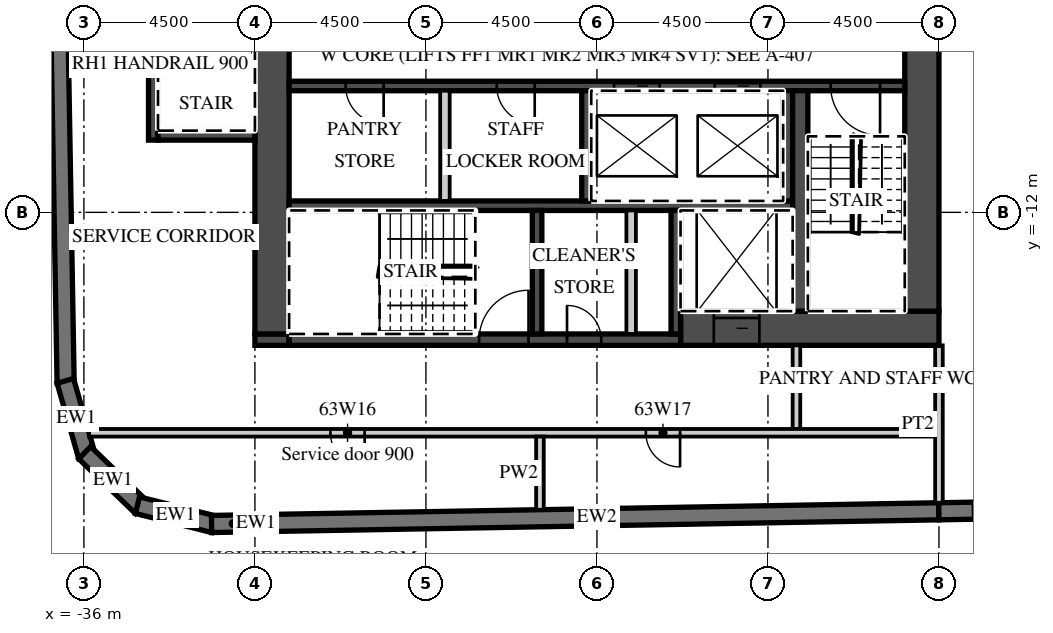
"""IFC4 building model, lengths in metres.
Left out: names, types, materials, properties, quantities, classifications, styles, units other than length and angle.
Written with IfcOpenShell. Run it as: python <this file> out.ifc"""

import sys

from ifc_helpers import new_model, si_unit, direction, frame, frame_2d, origin, place, context, subcontext, project, spatial, polyline, rectangle, outline, extrude, element, fill, save


model = new_model("IFC4")
c1 = context("Model", 3, precision=1e-05, world=origin(), true_north=direction((0.0, 1.0)))
c2 = subcontext(c1, "Body", "Model", "MODEL_VIEW")
j1 = project(units=[si_unit("LENGTHUNIT", "METRE"), si_unit("PLANEANGLEUNIT", "RADIAN")], contexts=[c1])
p1 = place(None, origin())
s1 = spatial("IfcSite", under=j1, at=p1, CompositionType="ELEMENT")
p2 = place(p1, origin())
s2 = spatial("IfcBuilding", under=s1, at=p2, CompositionType="ELEMENT")
p3 = place(p2, frame((0.0, 0.0, 254.0)))
s3 = spatial("IfcBuildingStorey", under=s2, at=p3, CompositionType="ELEMENT", Elevation=254.0)
p4 = place(p3, frame((-37.057, 16.503, 0.0), z_axis=(0.0, 0.0, 1.0), x_axis=(0.017452279857, -0.999847697366, 0.0)))
e1 = element("IfcWall", 1, at=p4, inside=s3, PredefinedType="SOLIDWALL", context=c2, shape_type="SweptSolid", body=[
    extrude(rectangle(XDim=33.0, YDim=0.45, at=frame_2d((16.5, 0.0))), origin(), (0.0, 0.0, 1.0), 3.0),
])
p5 = place(p3, frame((-36.49, -16.434, 0.0), z_axis=(0.0, 0.0, 1.0), x_axis=(0.275577603096, -0.961278827745, 0.0)))
e2 = element("IfcWall", 2, at=p5, inside=s3, PredefinedType="SOLIDWALL", context=c2, shape_type="SweptSolid", body=[
    extrude(outline(polyline([(0.0, -0.225), (2.071, -0.225), (1.95, 0.225), (0.121, 0.225), (0.0, -0.225)])), origin(), (0.0, 0.0, 1.0), 3.0),
])
p6 = place(p3, frame((-35.979, -18.324, 0.0), z_axis=(0.0, 0.0, 1.0), x_axis=(0.719320193998, -0.694678672846, 0.0)))
e3 = element("IfcWall", 3, at=p6, inside=s3, PredefinedType="SOLIDWALL", context=c2, shape_type="SweptSolid", body=[
    extrude(outline(polyline([(0.0, -0.225), (2.071, -0.225), (1.95, 0.225), (0.121, 0.225), (0.0, -0.225)])), origin(), (0.0, 0.0, 1.0), 3.0),
])
p7 = place(p3, frame((-34.591, -19.706, 0.0), z_axis=(0.0, 0.0, 1.0), x_axis=(0.970315655375, -0.241841950319, 0.0)))
e4 = element("IfcWall", 4, at=p7, inside=s3, PredefinedType="SOLIDWALL", context=c2, shape_type="SweptSolid", body=[
    extrude(outline(polyline([(0.0, -0.225), (2.071, -0.225), (1.95, 0.225), (0.121, 0.225), (0.0, -0.225)])), origin(), (0.0, 0.0, 1.0), 3.0),
])
p8 = place(p3, frame((-32.641, -20.2, 0.0), z_axis=(0.0, 0.0, 1.0), x_axis=(0.99984870815, 0.017394275206, 0.0)))
e5 = element("IfcWall", 5, at=p8, inside=s3, PredefinedType="SOLIDWALL", context=c2, shape_type="SweptSolid", body=[
    extrude(rectangle(XDim=1.137, YDim=0.45, at=frame_2d((0.568, 0.0))), origin(), (0.0, 0.0, 1.0), 3.0),
])
p9 = place(p3, frame((-31.504, -20.18, 0.0), z_axis=(0.0, 0.0, 1.0), x_axis=(0.999847677887, 0.017453395744, 0.0)))
e6 = element("IfcWall", 6, at=p9, inside=s3, PredefinedType="SOLIDWALL", context=c2, shape_type="SweptSolid", body=[
    extrude(rectangle(XDim=18.003, YDim=0.45, at=frame_2d((9.001, 0.0))), origin(), (0.0, 0.0, 1.0), 3.0),
])
p10 = place(p3, frame((-13.504, -19.866, 0.0), z_axis=(0.0, 0.0, 1.0), x_axis=(0.999847672978, 0.017453676992, 0.0)))
e7 = element("IfcWall", 7, at=p10, inside=s3, PredefinedType="SOLIDWALL", context=c2, shape_type="SweptSolid", body=[
    extrude(rectangle(XDim=52.86, YDim=0.45, at=frame_2d((26.43, 0.0))), origin(), (0.0, 0.0, 1.0), 3.0),
])
p11 = place(p10, frame((0.9, 0.0, 0.45)))
e8 = element("IfcOpeningElement", 8, at=p11, cuts=e7, PredefinedType="OPENING", context=c2, shape_type="SweptSolid", body=[
    extrude(rectangle(XDim=2.7, YDim=2.25, at=frame_2d((1.35, 1.125))), frame((0.0, 0.235, 0.0), z_axis=(0.0, -1.0, 0.0), x_axis=(1.0, 0.0, 0.0)), (0.0, 0.0, 1.0), 0.47),
])
p12 = place(p10, frame((5.401, 0.0, 0.45)))
e9 = element("IfcOpeningElement", 9, at=p12, cuts=e7, PredefinedType="OPENING", context=c2, shape_type="SweptSolid", body=[
    extrude(rectangle(XDim=2.7, YDim=2.25, at=frame_2d((1.35, 1.125))), frame((0.0, 0.235, 0.0), z_axis=(0.0, -1.0, 0.0), x_axis=(1.0, 0.0, 0.0)), (0.0, 0.0, 1.0), 0.47),
])
p13 = place(p10, frame((9.902, 0.0, 0.45)))
e10 = element("IfcOpeningElement", 10, at=p13, cuts=e7, PredefinedType="OPENING", context=c2, shape_type="SweptSolid", body=[
    extrude(rectangle(XDim=2.7, YDim=2.25, at=frame_2d((1.35, 1.125))), frame((0.0, 0.235, 0.0), z_axis=(0.0, -1.0, 0.0), x_axis=(1.0, 0.0, 0.0)), (0.0, 0.0, 1.0), 0.47),
])
p14 = place(p10, frame((14.402, 0.0, 0.45)))
e11 = element("IfcOpeningElement", 11, at=p14, cuts=e7, PredefinedType="OPENING", context=c2, shape_type="SweptSolid", body=[
    extrude(rectangle(XDim=2.7, YDim=2.25, at=frame_2d((1.35, 1.125))), frame((0.0, 0.235, 0.0), z_axis=(0.0, -1.0, 0.0), x_axis=(1.0, 0.0, 0.0)), (0.0, 0.0, 1.0), 0.47),
])
p15 = place(p10, frame((18.903, 0.0, 0.45)))
e12 = element("IfcOpeningElement", 12, at=p15, cuts=e7, PredefinedType="OPENING", context=c2, shape_type="SweptSolid", body=[
    extrude(rectangle(XDim=2.7, YDim=2.25, at=frame_2d((1.35, 1.125))), frame((0.0, 0.235, 0.0), z_axis=(0.0, -1.0, 0.0), x_axis=(1.0, 0.0, 0.0)), (0.0, 0.0, 1.0), 0.47),
])
p16 = place(p10, frame((23.404, 0.0, 0.45)))
e13 = element("IfcOpeningElement", 13, at=p16, cuts=e7, PredefinedType="OPENING", context=c2, shape_type="SweptSolid", body=[
    extrude(rectangle(XDim=2.7, YDim=2.25, at=frame_2d((1.35, 1.125))), frame((0.0, 0.235, 0.0), z_axis=(0.0, -1.0, 0.0), x_axis=(1.0, 0.0, 0.0)), (0.0, 0.0, 1.0), 0.47),
])
p17 = place(p10, frame((27.904, 0.0, 0.45)))
e14 = element("IfcOpeningElement", 14, at=p17, cuts=e7, PredefinedType="OPENING", context=c2, shape_type="SweptSolid", body=[
    extrude(rectangle(XDim=2.7, YDim=2.25, at=frame_2d((1.35, 1.125))), frame((0.0, 0.235, 0.0), z_axis=(0.0, -1.0, 0.0), x_axis=(1.0, 0.0, 0.0)), (0.0, 0.0, 1.0), 0.47),
])
p18 = place(p10, frame((32.405, 0.0, 0.45)))
e15 = element("IfcOpeningElement", 15, at=p18, cuts=e7, PredefinedType="OPENING", context=c2, shape_type="SweptSolid", body=[
    extrude(rectangle(XDim=2.7, YDim=2.25, at=frame_2d((1.35, 1.125))), frame((0.0, 0.235, 0.0), z_axis=(0.0, -1.0, 0.0), x_axis=(1.0, 0.0, 0.0)), (0.0, 0.0, 1.0), 0.47),
])
p19 = place(p10, frame((36.906, 0.0, 0.45)))
e16 = element("IfcOpeningElement", 16, at=p19, cuts=e7, PredefinedType="OPENING", context=c2, shape_type="SweptSolid", body=[
    extrude(rectangle(XDim=2.7, YDim=2.25, at=frame_2d((1.35, 1.125))), frame((0.0, 0.235, 0.0), z_axis=(0.0, -1.0, 0.0), x_axis=(1.0, 0.0, 0.0)), (0.0, 0.0, 1.0), 0.47),
])
p20 = place(p10, frame((41.406, 0.0, 0.45)))
e17 = element("IfcOpeningElement", 17, at=p20, cuts=e7, PredefinedType="OPENING", context=c2, shape_type="SweptSolid", body=[
    extrude(rectangle(XDim=2.7, YDim=2.25, at=frame_2d((1.35, 1.125))), frame((0.0, 0.235, 0.0), z_axis=(0.0, -1.0, 0.0), x_axis=(1.0, 0.0, 0.0)), (0.0, 0.0, 1.0), 0.47),
])
p21 = place(p10, frame((45.907, 0.0, 0.45)))
e18 = element("IfcOpeningElement", 18, at=p21, cuts=e7, PredefinedType="OPENING", context=c2, shape_type="SweptSolid", body=[
    extrude(rectangle(XDim=2.7, YDim=2.25, at=frame_2d((1.35, 1.125))), frame((0.0, 0.235, 0.0), z_axis=(0.0, -1.0, 0.0), x_axis=(1.0, 0.0, 0.0)), (0.0, 0.0, 1.0), 0.47),
])
p22 = place(p3, frame((-13.5, -19.641, 0.0), z_axis=(0.0, 0.0, 1.0), x_axis=(0.0, 1.0, 0.0)))
e19 = element("IfcWall", 19, at=p22, inside=s3, PredefinedType="PARTITIONING", context=c2, shape_type="SweptSolid", body=[
    extrude(rectangle(XDim=4.141, YDim=0.2, at=frame_2d((2.071, 0.0))), origin(), (0.0, 0.0, 1.0), 3.0),
])
p23 = place(p3, frame((-20.3, -15.05, 0.0), z_axis=(0.0, 0.0, 1.0), x_axis=(1.0, 0.0, 0.0)))
e20 = element("IfcWall", 20, at=p23, inside=s3, PredefinedType="SHEAR", context=c2, shape_type="SweptSolid", body=[
    extrude(rectangle(XDim=6.8, YDim=0.9, at=frame_2d((3.4, 0.0))), origin(), (0.0, 0.0, 1.0), 3.0),
])
p24 = place(p23, frame((0.875, 0.0, 0.0)))
e21 = element("IfcOpeningElement", 21, at=p24, cuts=e20, PredefinedType="OPENING", context=c2, shape_type="SweptSolid", body=[
    extrude(rectangle(XDim=1.2, YDim=2.1, at=frame_2d((0.6, 1.05))), frame((0.0, 0.46, 0.0), z_axis=(0.0, -1.0, 0.0), x_axis=(1.0, 0.0, 0.0)), (0.0, 0.0, 1.0), 0.92),
])
p25 = place(p3, frame((-31.5, -15.35, 0.0), z_axis=(0.0, 0.0, 1.0), x_axis=(1.0, 0.0, 0.0)))
e22 = element("IfcWall", 22, at=p25, inside=s3, PredefinedType="SHEAR", context=c2, shape_type="SweptSolid", body=[
    extrude(rectangle(XDim=0.9, YDim=0.3, at=frame_2d((0.45, 0.0))), origin(), (0.0, 0.0, 1.0), 3.0),
])
p26 = place(p3, frame((-30.6, -15.35, 0.0), z_axis=(0.0, 0.0, 1.0), x_axis=(1.0, 0.0, 0.0)))
e23 = element("IfcWall", 23, at=p26, inside=s3, PredefinedType="SHEAR", context=c2, shape_type="SweptSolid", body=[
    extrude(rectangle(XDim=10.3, YDim=0.3, at=frame_2d((5.15, 0.0))), origin(), (0.0, 0.0, 1.0), 3.0),
])
p27 = place(p26, frame((5.0, 0.0, 0.0)))
e24 = element("IfcOpeningElement", 24, at=p27, cuts=e23, PredefinedType="OPENING", context=c2, shape_type="SweptSolid", body=[
    extrude(rectangle(XDim=1.3, YDim=2.1, at=frame_2d((0.65, 1.05))), frame((0.0, 0.16, 0.0), z_axis=(0.0, -1.0, 0.0), x_axis=(1.0, 0.0, 0.0)), (0.0, 0.0, 1.0), 0.32),
])
p28 = place(p26, frame((7.312, 0.0, 0.0)))
e25 = element("IfcOpeningElement", 25, at=p28, cuts=e23, PredefinedType="OPENING", context=c2, shape_type="SweptSolid", body=[
    extrude(rectangle(XDim=0.9, YDim=2.1, at=frame_2d((0.45, 1.05))), frame((0.0, 0.16, 0.0), z_axis=(0.0, -1.0, 0.0), x_axis=(1.0, 0.0, 0.0)), (0.0, 0.0, 1.0), 0.32),
])
p29 = place(p3, frame((-31.05, -15.2, 0.0), z_axis=(0.0, 0.0, 1.0), x_axis=(0.0, 1.0, 0.0)))
e26 = element("IfcWall", 26, at=p29, inside=s3, PredefinedType="SHEAR", context=c2, shape_type="SweptSolid", body=[
    extrude(rectangle(XDim=12.8, YDim=0.9, at=frame_2d((6.4, 0.0))), origin(), (0.0, 0.0, 1.0), 3.0),
])
p30 = place(p29, frame((11.5, 0.0, 0.0)))
e27 = element("IfcOpeningElement", 27, at=p30, cuts=e26, PredefinedType="OPENING", context=c2, shape_type="SweptSolid", body=[
    extrude(rectangle(XDim=1.1, YDim=2.1, at=frame_2d((0.55, 1.05))), frame((0.0, 0.46, 0.0), z_axis=(0.0, -1.0, 0.0), x_axis=(1.0, 0.0, 0.0)), (0.0, 0.0, 1.0), 0.92),
])
p31 = place(p3, frame((-13.95, -14.6, 0.0), z_axis=(0.0, 0.0, 1.0), x_axis=(0.0, 1.0, 0.0)))
e28 = element("IfcWall", 28, at=p31, inside=s3, PredefinedType="SHEAR", context=c2, shape_type="SweptSolid", body=[
    extrude(rectangle(XDim=12.2, YDim=0.9, at=frame_2d((6.1, 0.0))), origin(), (0.0, 0.0, 1.0), 3.0),
])
p32 = place(p3, frame((-30.6, -8.675, 0.0), z_axis=(0.0, 0.0, 1.0), x_axis=(1.0, 0.0, 0.0)))
e29 = element("IfcWall", 29, at=p32, inside=s3, PredefinedType="SHEAR", context=c2, shape_type="SweptSolid", body=[
    extrude(rectangle(XDim=16.2, YDim=0.25, at=frame_2d((8.1, 0.0))), origin(), (0.0, 0.0, 1.0), 3.0),
])
p33 = place(p32, frame((8.55, 0.0, 0.0)))
e30 = element("IfcOpeningElement", 30, at=p33, cuts=e29, PredefinedType="OPENING", context=c2, shape_type="SweptSolid", body=[
    extrude(rectangle(XDim=1.2, YDim=2.1, at=frame_2d((0.6, 1.05))), frame((0.0, 0.135, 0.0), z_axis=(0.0, -1.0, 0.0), x_axis=(1.0, 0.0, 0.0)), (0.0, 0.0, 1.0), 0.27),
])
p34 = place(p32, frame((11.2, 0.0, 0.0)))
e31 = element("IfcOpeningElement", 31, at=p34, cuts=e29, PredefinedType="OPENING", context=c2, shape_type="SweptSolid", body=[
    extrude(rectangle(XDim=1.2, YDim=2.1, at=frame_2d((0.6, 1.05))), frame((0.0, 0.135, 0.0), z_axis=(0.0, -1.0, 0.0), x_axis=(1.0, 0.0, 0.0)), (0.0, 0.0, 1.0), 0.27),
])
p35 = place(p32, frame((14.25, 0.0, 0.0)))
e32 = element("IfcOpeningElement", 32, at=p35, cuts=e29, PredefinedType="OPENING", context=c2, shape_type="SweptSolid", body=[
    extrude(rectangle(XDim=1.3, YDim=2.1, at=frame_2d((0.65, 1.05))), frame((0.0, 0.135, 0.0), z_axis=(0.0, -1.0, 0.0), x_axis=(1.0, 0.0, 0.0)), (0.0, 0.0, 1.0), 0.27),
])
p36 = place(p32, frame((1.488, 0.0, 0.0)))
e33 = element("IfcOpeningElement", 33, at=p36, cuts=e29, PredefinedType="OPENING", context=c2, shape_type="SweptSolid", body=[
    extrude(rectangle(XDim=1.0, YDim=2.1, at=frame_2d((0.5, 1.05))), frame((0.0, 0.135, 0.0), z_axis=(0.0, -1.0, 0.0), x_axis=(1.0, 0.0, 0.0)), (0.0, 0.0, 1.0), 0.27),
])
p37 = place(p32, frame((5.462, 0.0, 0.0)))
e34 = element("IfcOpeningElement", 34, at=p37, cuts=e29, PredefinedType="OPENING", context=c2, shape_type="SweptSolid", body=[
    extrude(rectangle(XDim=1.0, YDim=2.1, at=frame_2d((0.5, 1.05))), frame((0.0, 0.135, 0.0), z_axis=(0.0, -1.0, 0.0), x_axis=(1.0, 0.0, 0.0)), (0.0, 0.0, 1.0), 0.27),
])
p38 = place(p3, frame((-30.6, -11.825, 0.0), z_axis=(0.0, 0.0, 1.0), x_axis=(1.0, 0.0, 0.0)))
e35 = element("IfcWall", 35, at=p38, inside=s3, PredefinedType="SHEAR", context=c2, shape_type="SweptSolid", body=[
    extrude(rectangle(XDim=13.25, YDim=0.25, at=frame_2d((6.625, 0.0))), origin(), (0.0, 0.0, 1.0), 3.0),
])
for number, where, z_axis, x_axis in (
    (36, (-17.475, -11.7, 0.0), (0.0, 0.0, 1.0), (0.0, 1.0, 0.0)),
    (37, (-22.775, -11.7, 0.0), (0.0, 0.0, 1.0), (0.0, 1.0, 0.0)),
):
    element("IfcWall", number, at=place(p3, frame(where, z_axis=z_axis, x_axis=x_axis)), inside=s3, PredefinedType="SHEAR", context=c2, shape_type="SweptSolid", body=[
        extrude(rectangle(XDim=2.9, YDim=0.25, at=frame_2d((1.45, 0.0))), origin(), (0.0, 0.0, 1.0), 3.0),
    ])
p39 = place(p3, frame((-26.5, -11.7, 0.0), z_axis=(0.0, 0.0, 1.0), x_axis=(0.0, 1.0, 0.0)))
e38 = element("IfcWall", 38, at=p39, inside=s3, PredefinedType="PARTITIONING", context=c2, shape_type="SweptSolid", body=[
    extrude(rectangle(XDim=2.9, YDim=0.25, at=frame_2d((1.45, 0.0))), origin(), (0.0, 0.0, 1.0), 3.0),
])
p40 = place(p3, frame((-17.15, -14.6, 0.0), z_axis=(0.0, 0.0, 1.0), x_axis=(0.0, 1.0, 0.0)))
e39 = element("IfcWall", 39, at=p40, inside=s3, PredefinedType="SHEAR", context=c2, shape_type="SweptSolid", body=[
    extrude(rectangle(XDim=5.8, YDim=0.4, at=frame_2d((2.9, 0.0))), origin(), (0.0, 0.0, 1.0), 3.0),
])
for number, where, z_axis, x_axis in (
    (40, (-20.425, -15.2, 0.0), (0.0, 0.0, 1.0), (0.0, 1.0, 0.0)),
    (41, (-24.075, -15.2, 0.0), (0.0, 0.0, 1.0), (0.0, 1.0, 0.0)),
):
    element("IfcWall", number, at=place(p3, frame(where, z_axis=z_axis, x_axis=x_axis)), inside=s3, PredefinedType="SHEAR", context=c2, shape_type="SweptSolid", body=[
        extrude(rectangle(XDim=3.25, YDim=0.25, at=frame_2d((1.625, 0.0))), origin(), (0.0, 0.0, 1.0), 3.0),
    ])
p41 = place(p3, frame((-21.6, -15.2, 0.0), z_axis=(0.0, 0.0, 1.0), x_axis=(0.0, 1.0, 0.0)))
e42 = element("IfcWall", 42, at=p41, inside=s3, PredefinedType="PARTITIONING", context=c2, shape_type="SweptSolid", body=[
    extrude(rectangle(XDim=3.25, YDim=0.25, at=frame_2d((1.625, 0.0))), origin(), (0.0, 0.0, 1.0), 3.0),
])
p42 = place(p3, frame((-34.175, -10.1, 0.0), z_axis=(0.0, 0.0, 1.0), x_axis=(0.0, 1.0, 0.0)))
e43 = element("IfcWall", 43, at=p42, inside=s3, PredefinedType="SHEAR", context=c2, shape_type="SweptSolid", body=[
    extrude(rectangle(XDim=8.35, YDim=0.25, at=frame_2d((4.175, 0.0))), origin(), (0.0, 0.0, 1.0), 3.0),
])
p43 = place(p3, frame((-34.05, -9.975, 0.0), z_axis=(0.0, 0.0, 1.0), x_axis=(1.0, 0.0, 0.0)))
e44 = element("IfcWall", 44, at=p43, inside=s3, PredefinedType="SHEAR", context=c2, shape_type="SweptSolid", body=[
    extrude(rectangle(XDim=2.55, YDim=0.25, at=frame_2d((1.275, 0.0))), origin(), (0.0, 0.0, 1.0), 3.0),
])
p44 = place(p3, frame((-17.25, -17.7, 0.0), z_axis=(0.0, 0.0, 1.0), x_axis=(0.0, 1.0, 0.0)))
e45 = element("IfcWall", 45, at=p44, inside=s3, PredefinedType="PARTITIONING", context=c2, shape_type="SweptSolid", body=[
    extrude(rectangle(XDim=2.2, YDim=0.2, at=frame_2d((1.1, 0.0))), origin(), (0.0, 0.0, 1.0), 3.0),
])
p45 = place(p3, frame((-35.864, -17.8, 0.0), z_axis=(0.0, 0.0, 1.0), x_axis=(1.0, 0.0, 0.0)))
e46 = element("IfcWall", 46, at=p45, inside=s3, PredefinedType="PARTITIONING", context=c2, shape_type="SweptSolid", body=[
    extrude(rectangle(XDim=22.264, YDim=0.2, at=frame_2d((11.132, 0.0))), origin(), (0.0, 0.0, 1.0), 3.0),
])
p46 = place(p45, frame((6.351, 0.0, 0.0)))
e47 = element("IfcOpeningElement", 47, at=p46, cuts=e46, PredefinedType="OPENING", context=c2, shape_type="SweptSolid", body=[
    extrude(rectangle(XDim=0.9, YDim=2.1, at=frame_2d((0.45, 1.05))), frame((0.0, 0.11, 0.0), z_axis=(0.0, -1.0, 0.0), x_axis=(1.0, 0.0, 0.0)), (0.0, 0.0, 1.0), 0.22),
])
p47 = place(p45, frame((14.651, 0.0, 0.0)))
e48 = element("IfcOpeningElement", 48, at=p47, cuts=e46, PredefinedType="OPENING", context=c2, shape_type="SweptSolid", body=[
    extrude(rectangle(XDim=0.9, YDim=2.1, at=frame_2d((0.45, 1.05))), frame((0.0, 0.11, 0.0), z_axis=(0.0, -1.0, 0.0), x_axis=(1.0, 0.0, 0.0)), (0.0, 0.0, 1.0), 0.22),
])
p48 = place(p3, frame((-24.0, -19.824, 0.0), z_axis=(0.0, 0.0, 1.0), x_axis=(0.0, 1.0, 0.0)))
e49 = element("IfcWall", 49, at=p48, inside=s3, PredefinedType="PARTITIONING", context=c2, shape_type="SweptSolid", body=[
    extrude(rectangle(XDim=1.925, YDim=0.2, at=frame_2d((0.962, 0.0))), origin(), (0.0, 0.0, 1.0), 3.0),
])
p49 = place(p11, origin())
e50 = element("IfcWindow", 50, at=p49, inside=s3, PartitioningType="SINGLE_PANEL", PredefinedType="WINDOW", context=c2, shape_type="SweptSolid", body=[
    extrude(rectangle(XDim=2.7, YDim=2.25, at=frame_2d((1.35, 1.125))), frame((0.0, 0.09, 0.0), z_axis=(0.0, -1.0, 0.0), x_axis=(1.0, 0.0, 0.0)), (0.0, 0.0, 1.0), 0.06),
])
fill(e8, e50)
p50 = place(p33, origin())
e51 = element("IfcDoor", 51, at=p50, inside=s3, OperationType="SLIDING_TO_LEFT", PredefinedType="DOOR", context=c2, shape_type="SweptSolid", body=[
    extrude(rectangle(XDim=1.2, YDim=2.1, at=frame_2d((0.6, 1.05))), frame((0.0, 0.025, 0.0), z_axis=(0.0, -1.0, 0.0), x_axis=(1.0, 0.0, 0.0)), (0.0, 0.0, 1.0), 0.05),
])
fill(e30, e51)
p51 = place(p34, origin())
e52 = element("IfcDoor", 52, at=p51, inside=s3, OperationType="SLIDING_TO_RIGHT", PredefinedType="DOOR", context=c2, shape_type="SweptSolid", body=[
    extrude(rectangle(XDim=1.2, YDim=2.1, at=frame_2d((0.6, 1.05))), frame((0.0, 0.025, 0.0), z_axis=(0.0, -1.0, 0.0), x_axis=(1.0, 0.0, 0.0)), (0.0, 0.0, 1.0), 0.05),
])
fill(e31, e52)
p52 = place(p24, origin())
e53 = element("IfcDoor", 53, at=p52, inside=s3, OperationType="SLIDING_TO_LEFT", PredefinedType="DOOR", context=c2, shape_type="SweptSolid", body=[
    extrude(rectangle(XDim=1.2, YDim=2.1, at=frame_2d((0.6, 1.05))), frame((0.0, 0.025, 0.0), z_axis=(0.0, -1.0, 0.0), x_axis=(1.0, 0.0, 0.0)), (0.0, 0.0, 1.0), 0.05),
])
fill(e21, e53)
p53 = place(p35, origin())
e54 = element("IfcDoor", 54, at=p53, inside=s3, OperationType="SINGLE_SWING_RIGHT", PredefinedType="DOOR", context=c2, shape_type="SweptSolid", body=[
    extrude(rectangle(XDim=1.3, YDim=2.1, at=frame_2d((0.65, 1.05))), frame((0.0, 0.025, 0.0), z_axis=(0.0, -1.0, 0.0), x_axis=(1.0, 0.0, 0.0)), (0.0, 0.0, 1.0), 0.05),
])
fill(e32, e54)
p54 = place(p27, origin())
e55 = element("IfcDoor", 55, at=p54, inside=s3, OperationType="SINGLE_SWING_RIGHT", PredefinedType="DOOR", context=c2, shape_type="SweptSolid", body=[
    extrude(rectangle(XDim=1.3, YDim=2.1, at=frame_2d((0.65, 1.05))), frame((0.0, 0.025, 0.0), z_axis=(0.0, -1.0, 0.0), x_axis=(1.0, 0.0, 0.0)), (0.0, 0.0, 1.0), 0.05),
])
fill(e24, e55)
p55 = place(p28, origin())
e56 = element("IfcDoor", 56, at=p55, inside=s3, OperationType="SINGLE_SWING_LEFT", PredefinedType="DOOR", context=c2, shape_type="SweptSolid", body=[
    extrude(rectangle(XDim=0.9, YDim=2.1, at=frame_2d((0.45, 1.05))), frame((0.0, 0.025, 0.0), z_axis=(0.0, -1.0, 0.0), x_axis=(1.0, 0.0, 0.0)), (0.0, 0.0, 1.0), 0.05),
])
fill(e25, e56)
p56 = place(p36, origin())
e57 = element("IfcDoor", 57, at=p56, inside=s3, OperationType="SINGLE_SWING_RIGHT", PredefinedType="DOOR", context=c2, shape_type="SweptSolid", body=[
    extrude(rectangle(XDim=1.0, YDim=2.1, at=frame_2d((0.5, 1.05))), frame((0.0, 0.025, 0.0), z_axis=(0.0, -1.0, 0.0), x_axis=(1.0, 0.0, 0.0)), (0.0, 0.0, 1.0), 0.05),
])
fill(e33, e57)
p57 = place(p37, origin())
e58 = element("IfcDoor", 58, at=p57, inside=s3, OperationType="SINGLE_SWING_RIGHT", PredefinedType="DOOR", context=c2, shape_type="SweptSolid", body=[
    extrude(rectangle(XDim=1.0, YDim=2.1, at=frame_2d((0.5, 1.05))), frame((0.0, 0.025, 0.0), z_axis=(0.0, -1.0, 0.0), x_axis=(1.0, 0.0, 0.0)), (0.0, 0.0, 1.0), 0.05),
])
fill(e34, e58)
p58 = place(p46, origin())
e59 = element("IfcDoor", 59, at=p58, inside=s3, OperationType="SINGLE_SWING_RIGHT", PredefinedType="DOOR", context=c2, shape_type="SweptSolid", body=[
    extrude(rectangle(XDim=0.9, YDim=2.1, at=frame_2d((0.45, 1.05))), frame((0.0, 0.025, 0.0), z_axis=(0.0, -1.0, 0.0), x_axis=(1.0, 0.0, 0.0)), (0.0, 0.0, 1.0), 0.05),
])
fill(e47, e59)
p59 = place(p47, origin())
e60 = element("IfcDoor", 60, at=p59, inside=s3, OperationType="SINGLE_SWING_RIGHT", PredefinedType="DOOR", context=c2, shape_type="SweptSolid", body=[
    extrude(rectangle(XDim=0.9, YDim=2.1, at=frame_2d((0.45, 1.05))), frame((0.0, 0.025, 0.0), z_axis=(0.0, -1.0, 0.0), x_axis=(1.0, 0.0, 0.0)), (0.0, 0.0, 1.0), 0.05),
])
fill(e48, e60)
save(model, sys.argv[1])
